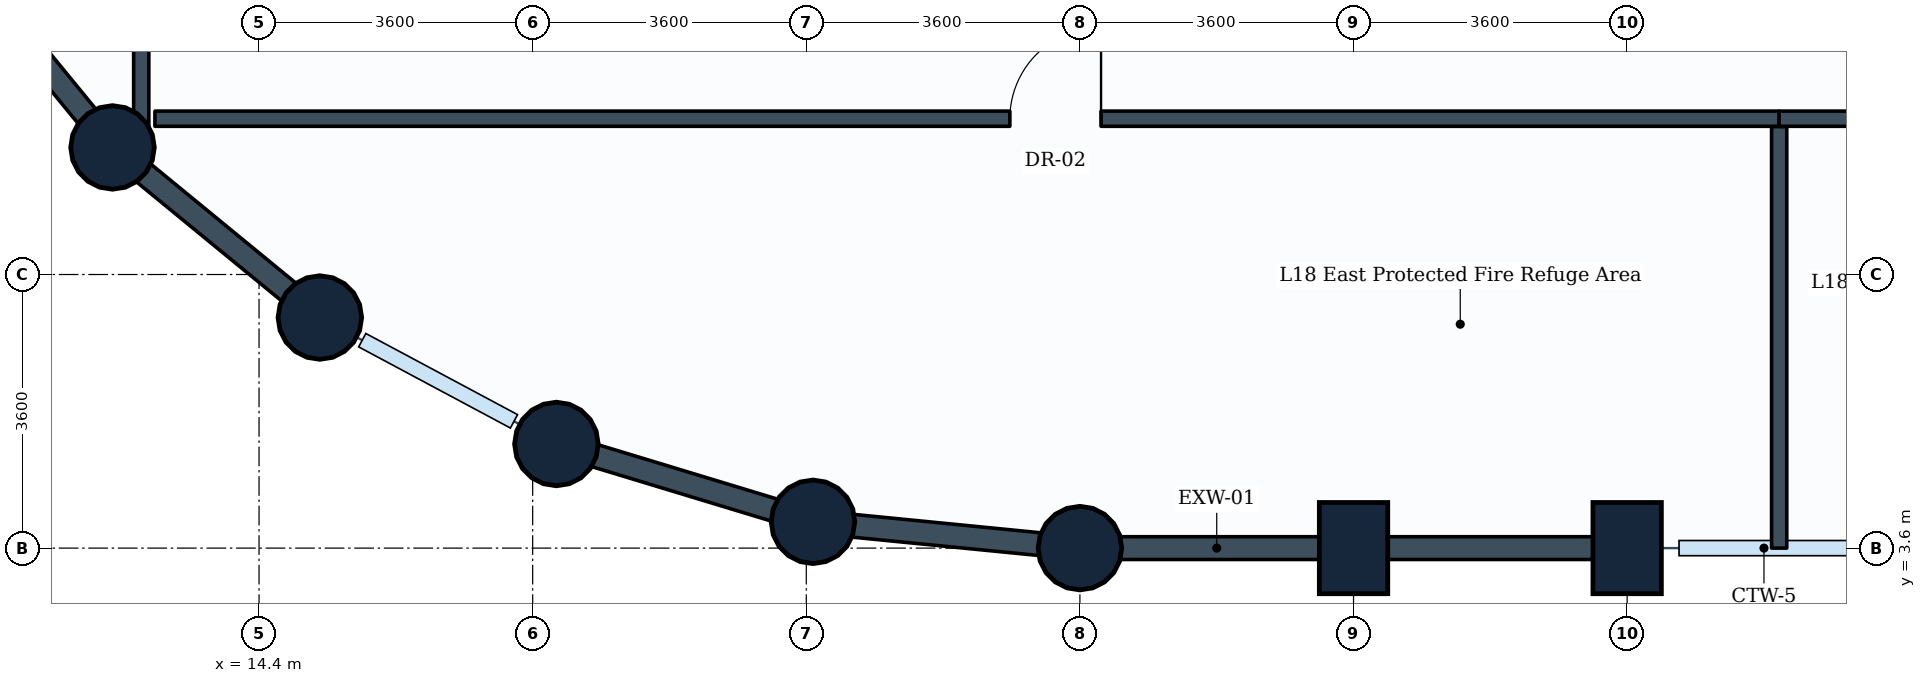
"""IFC4 building model, lengths in metres.
Left out: names, types, materials, properties, quantities, classifications, styles, units other than length and angle.
Written with IfcOpenShell. Run it as: python <this file> out.ifc"""

import sys

from ifc_helpers import new_model, si_unit, direction, frame, frame_2d, origin, origin_2d, place, context, subcontext, project, spatial, rectangle, circle, extrude, element, fill, save


model = new_model("IFC4")
c1 = context("Model", 3, precision=1e-05, world=origin(), true_north=direction((0.0, 1.0)))
c2 = subcontext(c1, "Body", "Model", "MODEL_VIEW")
j1 = project(units=[si_unit("LENGTHUNIT", "METRE"), si_unit("PLANEANGLEUNIT", "RADIAN")], contexts=[c1])
p1 = place(None, origin())
s1 = spatial("IfcSite", under=j1, at=p1, CompositionType="ELEMENT")
p2 = place(p1, origin())
s2 = spatial("IfcBuilding", under=s1, at=p2, CompositionType="ELEMENT")
p3 = place(p2, frame((0.0, 0.0, 74.7)))
s3 = spatial("IfcBuildingStorey", under=s2, at=p3, CompositionType="ELEMENT", Elevation=74.7)
for number, where, z_axis, x_axis in (
    (1, (12.472, 8.872, 0.0), (0.0, 0.0, 1.0), (1.0, 0.0, 0.0)),
    (2, (15.2, 6.634, 0.0), (0.0, 0.0, 1.0), (1.0, 0.0, 0.0)),
    (3, (18.312, 4.97, 0.0), (0.0, 0.0, 1.0), (1.0, 0.0, 0.0)),
    (4, (21.688, 3.946, 0.0), (0.0, 0.0, 1.0), (1.0, 0.0, 0.0)),
    (5, (25.2, 3.6, 0.0), (0.0, 0.0, 1.0), (1.0, 0.0, 0.0)),
):
    element("IfcColumn", number, at=place(p3, frame(where, z_axis=z_axis, x_axis=x_axis)), inside=s3, PredefinedType="COLUMN", context=c2, shape_type="SweptSolid", body=[
        extrude(circle(Radius=0.55, at=origin_2d()), origin(), (0.0, 0.0, 1.0), 5.4),
    ])
for number, where, z_axis, x_axis in (
    (6, (28.8, 3.6, 0.0), (0.0, 0.0, 1.0), (1.0, 0.0, 0.0)),
    (7, (32.4, 3.6, 0.0), (0.0, 0.0, 1.0), (1.0, 0.0, 0.0)),
):
    element("IfcColumn", number, at=place(p3, frame(where, z_axis=z_axis, x_axis=x_axis)), inside=s3, PredefinedType="COLUMN", context=c2, shape_type="SweptSolid", body=[
        extrude(rectangle(XDim=0.9, YDim=1.2, at=origin_2d()), origin(), (0.0, 0.0, 1.0), 5.4),
    ])
p4 = place(p3, frame((28.8, 3.6, 0.0), z_axis=(0.0, 0.0, 1.0), x_axis=(-1.0, 0.0, 0.0)))
e8 = element("IfcWall", 8, at=p4, inside=s3, PredefinedType="STANDARD", context=c2, shape_type="SweptSolid", body=[
    extrude(rectangle(XDim=3.6, YDim=0.3, at=frame_2d((1.8, 0.0))), origin(), (0.0, 0.0, 1.0), 4.43),
])
p5 = place(p3, frame((32.4, 3.6, 0.0), z_axis=(0.0, 0.0, 1.0), x_axis=(-1.0, 0.0, 0.0)))
e9 = element("IfcWall", 9, at=p5, inside=s3, PredefinedType="STANDARD", context=c2, shape_type="SweptSolid", body=[
    extrude(rectangle(XDim=3.6, YDim=0.3, at=frame_2d((1.8, 0.0))), origin(), (0.0, 0.0, 1.0), 4.43),
])
for number, where, z_axis, x_axis in (
    (10, (12.472, 8.872, 0.0), (0.0, 0.0, 1.0), (-0.634, 0.773, 0.0)),
    (11, (15.2, 6.634, 0.0), (0.0, 0.0, 1.0), (-0.773, 0.634, 0.0)),
):
    element("IfcWall", number, at=place(p3, frame(where, z_axis=z_axis, x_axis=x_axis)), inside=s3, PredefinedType="STANDARD", context=c2, shape_type="SweptSolid", body=[
        extrude(rectangle(XDim=3.529, YDim=0.3, at=frame_2d((1.764, 0.0))), origin(), (0.0, 0.0, 1.0), 4.43),
    ])
p6 = place(p3, frame((21.688, 3.946, 0.0), z_axis=(0.0, 0.0, 1.0), x_axis=(-0.956953367403, 0.290241714123, 0.0)))
e12 = element("IfcWall", 12, at=p6, inside=s3, PredefinedType="STANDARD", context=c2, shape_type="SweptSolid", body=[
    extrude(rectangle(XDim=3.528, YDim=0.3, at=frame_2d((1.764, 0.0))), origin(), (0.0, 0.0, 1.0), 4.43),
])
p7 = place(p3, frame((25.2, 3.6, 0.0), z_axis=(0.0, 0.0, 1.0), x_axis=(-0.995183369056, 0.098030923459, 0.0)))
e13 = element("IfcWall", 13, at=p7, inside=s3, PredefinedType="STANDARD", context=c2, shape_type="SweptSolid", body=[
    extrude(rectangle(XDim=3.529, YDim=0.3, at=frame_2d((1.765, 0.0))), origin(), (0.0, 0.0, 1.0), 4.43),
])
p8 = place(p3, frame((12.85, 8.716, 0.0), z_axis=(0.0, 0.0, 1.0), x_axis=(0.0, 1.0, 0.0)))
e14 = element("IfcWall", 14, at=p8, inside=s3, PredefinedType="PARTITIONING", context=c2, shape_type="SweptSolid", body=[
    extrude(rectangle(XDim=16.484, YDim=0.2, at=frame_2d((8.242, 0.0))), origin(), (0.0, 0.0, 1.0), 4.43),
])
p9 = place(p8, frame((7.565, 0.0, 0.0)))
e15 = element("IfcOpeningElement", 15, at=p9, cuts=e14, PredefinedType="OPENING", context=c2, shape_type="SweptSolid", body=[
    extrude(rectangle(XDim=1.2, YDim=2.1, at=frame_2d((0.6, 1.05))), frame((0.0, 0.11, 0.0), z_axis=(0.0, -1.0, 0.0), x_axis=(1.0, 0.0, 0.0)), (0.0, 0.0, 1.0), 0.22),
])
p10 = place(p3, frame((13.03, 9.25, 0.0), z_axis=(0.0, 0.0, 1.0), x_axis=(1.0, 0.0, 0.0)))
e16 = element("IfcWall", 16, at=p10, inside=s3, PredefinedType="PARTITIONING", context=c2, shape_type="SweptSolid", body=[
    extrude(rectangle(XDim=21.37, YDim=0.2, at=frame_2d((10.685, 0.0))), origin(), (0.0, 0.0, 1.0), 4.61),
])
p11 = place(p10, frame((11.248, 0.0, 0.0)))
e17 = element("IfcOpeningElement", 17, at=p11, cuts=e16, PredefinedType="OPENING", context=c2, shape_type="SweptSolid", body=[
    extrude(rectangle(XDim=1.2, YDim=2.1, at=frame_2d((0.6, 1.05))), frame((0.0, 0.11, 0.0), z_axis=(0.0, -1.0, 0.0), x_axis=(1.0, 0.0, 0.0)), (0.0, 0.0, 1.0), 0.22),
])
p12 = place(p3, frame((34.4, 3.6, 0.0), z_axis=(0.0, 0.0, 1.0), x_axis=(0.0, 1.0, 0.0)))
e18 = element("IfcWall", 18, at=p12, inside=s3, PredefinedType="PARTITIONING", context=c2, shape_type="SweptSolid", body=[
    extrude(rectangle(XDim=5.546, YDim=0.2, at=frame_2d((2.773, 0.0))), origin(), (0.0, 0.0, 1.0), 4.43),
])
p13 = place(p3, frame((34.4, 9.25, 0.0), z_axis=(0.0, 0.0, 1.0), x_axis=(1.0, 0.0, 0.0)))
e19 = element("IfcWall", 19, at=p13, inside=s3, PredefinedType="PARTITIONING", context=c2, shape_type="SweptSolid", body=[
    extrude(rectangle(XDim=16.55, YDim=0.2, at=frame_2d((8.275, 0.0))), origin(), (0.0, 0.0, 1.0), 4.61),
])
p14 = place(p13, frame((7.415, 0.0, 0.0)))
e20 = element("IfcOpeningElement", 20, at=p14, cuts=e19, PredefinedType="OPENING", context=c2, shape_type="SweptSolid", body=[
    extrude(rectangle(XDim=1.8, YDim=2.2, at=frame_2d((0.9, 1.1))), frame((0.0, 0.11, 0.0), z_axis=(0.0, -1.0, 0.0), x_axis=(1.0, 0.0, 0.0)), (0.0, 0.0, 1.0), 0.22),
])
p15 = place(p11, origin())
e21 = element("IfcDoor", 21, at=p15, inside=s3, OperationType="SINGLE_SWING_RIGHT", PredefinedType="DOOR", context=c2, shape_type="SweptSolid", body=[
    extrude(rectangle(XDim=1.2, YDim=2.1, at=frame_2d((0.6, 1.05))), frame((0.0, 0.025, 0.0), z_axis=(0.0, -1.0, 0.0), x_axis=(1.0, 0.0, 0.0)), (0.0, 0.0, 1.0), 0.05),
])
fill(e17, e21)
save(model, sys.argv[1])
